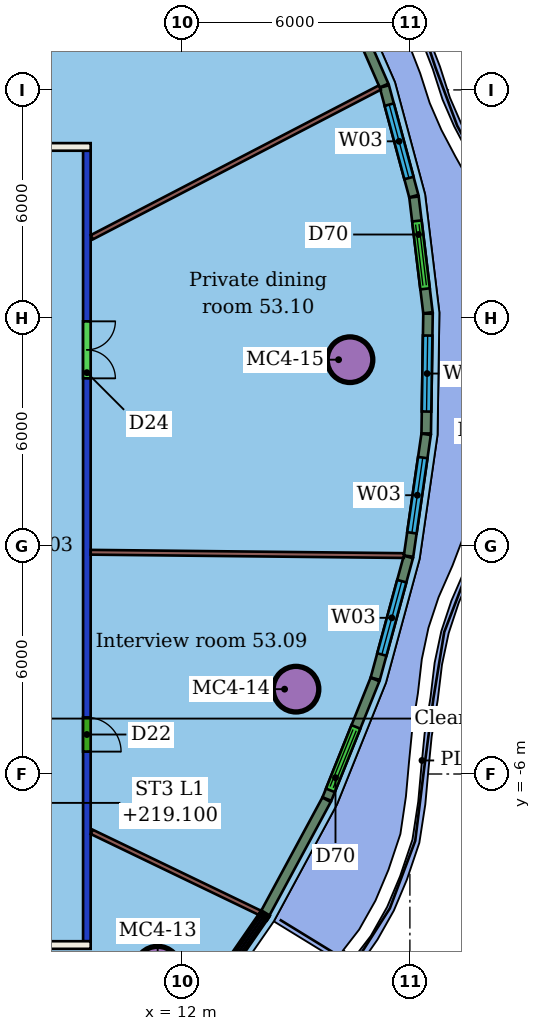
"""IFC4 building model, lengths in metres.
Left out: names, types, materials, properties, quantities, classifications, styles, units other than length and angle.
Written with IfcOpenShell. Run it as: python <this file> out.ifc"""

import sys

from ifc_helpers import new_model, si_unit, direction, frame, frame_2d, origin, origin_2d, place, context, subcontext, project, spatial, rectangle, hollow_circle, extrude, element, fill, save


model = new_model("IFC4")
c1 = context("Model", 3, precision=1e-05, world=origin(), true_north=direction((0.0, 1.0)))
c2 = subcontext(c1, "Body", "Model", "MODEL_VIEW")
j1 = project(units=[si_unit("LENGTHUNIT", "METRE"), si_unit("PLANEANGLEUNIT", "RADIAN")], contexts=[c1])
p1 = place(None, origin())
s1 = spatial("IfcSite", under=j1, at=p1, CompositionType="ELEMENT")
p2 = place(p1, origin())
s2 = spatial("IfcBuilding", under=s1, at=p2, CompositionType="ELEMENT")
p3 = place(p2, frame((0.0, 0.0, 217.3)))
s3 = spatial("IfcBuildingStorey", under=s2, at=p3, CompositionType="ELEMENT", Elevation=217.3)
for number, where, z_axis, x_axis in (
    (1, (11.363, -11.134, 0.0), (0.0, 0.0, 1.0), (1.0, 0.0, 0.0)),
    (2, (15.003, -3.768, 0.0), (0.0, 0.0, 1.0), (1.0, 0.0, 0.0)),
    (3, (16.424, 4.901, 0.0), (0.0, 0.0, 1.0), (1.0, 0.0, 0.0)),
):
    element("IfcColumn", number, at=place(p3, frame(where, z_axis=z_axis, x_axis=x_axis)), inside=s3, PredefinedType="COLUMN", context=c2, shape_type="SweptSolid", body=[
        extrude(hollow_circle(Radius=0.6, WallThickness=0.045, at=origin_2d()), origin(), (0.0, 0.0, 1.0), 3.45),
    ])
p4 = place(p3, frame((9.6, -10.5, 0.0), z_axis=(0.0, 0.0, 1.0), x_axis=(-1.0, 0.0, 0.0)))
e4 = element("IfcWall", 4, at=p4, inside=s3, PredefinedType="PARTITIONING", context=c2, shape_type="SweptSolid", body=[
    extrude(rectangle(XDim=31.2, YDim=0.2, at=frame_2d((15.6, 0.0))), origin(), (0.0, 0.0, 1.0), 3.45),
])
p5 = place(p4, frame((18.695, 0.0, 0.0)))
e5 = element("IfcOpeningElement", 5, at=p5, cuts=e4, PredefinedType="OPENING", context=c2, shape_type="SweptSolid", body=[
    extrude(rectangle(XDim=1.8, YDim=2.1, at=frame_2d((0.9, 1.05))), frame((0.0, 0.11, 0.0), z_axis=(0.0, -1.0, 0.0), x_axis=(1.0, 0.0, 0.0)), (0.0, 0.0, 1.0), 0.22),
])
p6 = place(p4, frame((12.68, 0.0, 0.0)))
e6 = element("IfcOpeningElement", 6, at=p6, cuts=e4, PredefinedType="OPENING", context=c2, shape_type="SweptSolid", body=[
    extrude(rectangle(XDim=1.2, YDim=2.4, at=frame_2d((0.6, 1.2))), frame((0.0, 0.11, 0.0), z_axis=(0.0, -1.0, 0.0), x_axis=(1.0, 0.0, 0.0)), (0.0, 0.0, 1.0), 0.22),
])
p7 = place(p4, frame((7.484, 0.0, 0.0)))
e7 = element("IfcOpeningElement", 7, at=p7, cuts=e4, PredefinedType="OPENING", context=c2, shape_type="SweptSolid", body=[
    extrude(rectangle(XDim=1.0, YDim=2.4, at=frame_2d((0.5, 1.2))), frame((0.0, 0.11, 0.0), z_axis=(0.0, -1.0, 0.0), x_axis=(1.0, 0.0, 0.0)), (0.0, 0.0, 1.0), 0.22),
])
p8 = place(p3, frame((-21.6, 10.5, 0.0), z_axis=(0.0, 0.0, 1.0), x_axis=(1.0, 0.0, 0.0)))
e8 = element("IfcWall", 8, at=p8, inside=s3, PredefinedType="PARTITIONING", context=c2, shape_type="SweptSolid", body=[
    extrude(rectangle(XDim=31.2, YDim=0.2, at=frame_2d((15.6, 0.0))), origin(), (0.0, 0.0, 1.0), 3.45),
])
p9 = place(p8, frame((20.759, 0.0, 0.0)))
e9 = element("IfcOpeningElement", 9, at=p9, cuts=e8, PredefinedType="OPENING", context=c2, shape_type="SweptSolid", body=[
    extrude(rectangle(XDim=1.0, YDim=2.4, at=frame_2d((0.5, 1.2))), frame((0.0, 0.11, 0.0), z_axis=(0.0, -1.0, 0.0), x_axis=(1.0, 0.0, 0.0)), (0.0, 0.0, 1.0), 0.22),
])
p10 = place(p8, frame((13.195, 0.0, 0.0)))
e10 = element("IfcOpeningElement", 10, at=p10, cuts=e8, PredefinedType="OPENING", context=c2, shape_type="SweptSolid", body=[
    extrude(rectangle(XDim=0.9, YDim=2.1, at=frame_2d((0.45, 1.05))), frame((0.0, 0.11, 0.0), z_axis=(0.0, -1.0, 0.0), x_axis=(1.0, 0.0, 0.0)), (0.0, 0.0, 1.0), 0.22),
])
p11 = place(p8, frame((8.927, 0.0, 0.0)))
e11 = element("IfcOpeningElement", 11, at=p11, cuts=e8, PredefinedType="OPENING", context=c2, shape_type="SweptSolid", body=[
    extrude(rectangle(XDim=0.9, YDim=2.1, at=frame_2d((0.45, 1.05))), frame((0.0, 0.11, 0.0), z_axis=(0.0, -1.0, 0.0), x_axis=(1.0, 0.0, 0.0)), (0.0, 0.0, 1.0), 0.22),
])
p12 = place(p8, frame((25.843, 0.0, 0.0)))
e12 = element("IfcOpeningElement", 12, at=p12, cuts=e8, PredefinedType="OPENING", context=c2, shape_type="SweptSolid", body=[
    extrude(rectangle(XDim=1.2, YDim=2.4, at=frame_2d((0.6, 1.2))), frame((0.0, 0.11, 0.0), z_axis=(0.0, -1.0, 0.0), x_axis=(1.0, 0.0, 0.0)), (0.0, 0.0, 1.0), 0.22),
])
p13 = place(p3, frame((9.5, 10.4, 0.0), z_axis=(0.0, 0.0, 1.0), x_axis=(0.0, -1.0, 0.0)))
e13 = element("IfcWall", 13, at=p13, inside=s3, PredefinedType="PARTITIONING", context=c2, shape_type="SweptSolid", body=[
    extrude(rectangle(XDim=20.8, YDim=0.2, at=frame_2d((10.4, 0.0))), origin(), (0.0, 0.0, 1.0), 3.05),
])
p14 = place(p13, frame((14.911, 0.0, 0.0)))
e14 = element("IfcOpeningElement", 14, at=p14, cuts=e13, PredefinedType="OPENING", context=c2, shape_type="SweptSolid", body=[
    extrude(rectangle(XDim=0.9, YDim=2.1, at=frame_2d((0.45, 1.05))), frame((0.0, 0.11, 0.0), z_axis=(0.0, -1.0, 0.0), x_axis=(1.0, 0.0, 0.0)), (0.0, 0.0, 1.0), 0.22),
])
p15 = place(p13, frame((4.489, 0.0, 0.0)))
e15 = element("IfcOpeningElement", 15, at=p15, cuts=e13, PredefinedType="OPENING", context=c2, shape_type="SweptSolid", body=[
    extrude(rectangle(XDim=1.5, YDim=2.1, at=frame_2d((0.75, 1.05))), frame((0.0, 0.11, 0.0), z_axis=(0.0, -1.0, 0.0), x_axis=(1.0, 0.0, 0.0)), (0.0, 0.0, 1.0), 0.22),
])
p16 = place(p3, frame((10.391, 21.124, 0.0), z_axis=(0.0, 0.0, 1.0), x_axis=(-0.613043629226, -0.790049054594, 0.0)))
e16 = element("IfcWall", 16, at=p16, inside=s3, PredefinedType="PARTITIONING", context=c2, shape_type="SweptSolid", body=[
    extrude(rectangle(XDim=13.271, YDim=0.125, at=frame_2d((6.636, 0.0))), origin(), (0.0, 0.0, 1.0), 3.45),
])
p17 = place(p3, frame((14.057, -9.655, 0.0), z_axis=(0.0, 0.0, 1.0), x_axis=(-0.901030422523, 0.433755896431, 0.0)))
e17 = element("IfcWall", 17, at=p17, inside=s3, PredefinedType="PARTITIONING", context=c2, shape_type="SweptSolid", body=[
    extrude(rectangle(XDim=4.917, YDim=0.125, at=frame_2d((2.458, 0.0))), origin(), (0.0, 0.0, 1.0), 3.45),
])
p18 = place(p3, frame((17.84, -0.253, 0.0), z_axis=(0.0, 0.0, 1.0), x_axis=(-0.999943746201, 0.0106068107, 0.0)))
e18 = element("IfcWall", 18, at=p18, inside=s3, PredefinedType="PARTITIONING", context=c2, shape_type="SweptSolid", body=[
    extrude(rectangle(XDim=8.24, YDim=0.125, at=frame_2d((4.12, 0.0))), origin(), (0.0, 0.0, 1.0), 3.45),
])
p19 = place(p3, frame((17.207, 12.061, 0.0), z_axis=(0.0, 0.0, 1.0), x_axis=(-0.887319286248, -0.461155596574, 0.0)))
e19 = element("IfcWall", 19, at=p19, inside=s3, PredefinedType="PARTITIONING", context=c2, shape_type="SweptSolid", body=[
    extrude(rectangle(XDim=8.54, YDim=0.125, at=frame_2d((4.27, 0.0))), origin(), (0.0, 0.0, 1.0), 3.45),
])
p20 = place(p3, frame((14.19, -9.671, 0.0), z_axis=(0.0, 0.0, 1.0), x_axis=(0.47528890286, 0.879829789685, 0.0)))
e20 = element("IfcWall", 20, at=p20, inside=s3, PredefinedType="SOLIDWALL", context=c2, shape_type="SweptSolid", body=[
    extrude(rectangle(XDim=3.403, YDim=0.25, at=frame_2d((1.701, 0.0))), origin(), (0.0, 0.0, 1.0), 3.1),
])
p21 = place(p3, frame((15.816, -6.658, 0.0), z_axis=(0.0, 0.0, 1.0), x_axis=(0.37322779977, 0.92773973154, 0.0)))
e21 = element("IfcWall", 21, at=p21, inside=s3, PredefinedType="SOLIDWALL", context=c2, shape_type="SweptSolid", body=[
    extrude(rectangle(XDim=3.39, YDim=0.25, at=frame_2d((1.695, 0.0))), origin(), (0.0, 0.0, 1.0), 3.1),
])
p22 = place(p21, frame((0.245, 0.0, 0.0)))
e22 = element("IfcOpeningElement", 22, at=p22, cuts=e21, PredefinedType="OPENING", context=c2, shape_type="SweptSolid", body=[
    extrude(rectangle(XDim=1.8, YDim=2.4, at=frame_2d((0.9, 1.2))), frame((0.0, 0.135, 0.0), z_axis=(0.0, -1.0, 0.0), x_axis=(1.0, 0.0, 0.0)), (0.0, 0.0, 1.0), 0.27),
])
p23 = place(p3, frame((17.089, -3.491, 0.0), z_axis=(0.0, 0.0, 1.0), x_axis=(0.262494842553, 0.964933395439, 0.0)))
e23 = element("IfcWall", 23, at=p23, inside=s3, PredefinedType="SOLIDWALL", context=c2, shape_type="SweptSolid", body=[
    extrude(rectangle(XDim=3.319, YDim=0.25, at=frame_2d((1.659, 0.0))), origin(), (0.0, 0.0, 1.0), 3.1),
])
p24 = place(p23, frame((0.659, 0.0, 0.9)))
e24 = element("IfcOpeningElement", 24, at=p24, cuts=e23, PredefinedType="OPENING", context=c2, shape_type="SweptSolid", body=[
    extrude(rectangle(XDim=2.0, YDim=2.1, at=frame_2d((1.0, 1.05))), frame((0.0, 0.135, 0.0), z_axis=(0.0, -1.0, 0.0), x_axis=(1.0, 0.0, 0.0)), (0.0, 0.0, 1.0), 0.27),
])
p25 = place(p3, frame((17.964, -0.267, 0.0), z_axis=(0.0, 0.0, 1.0), x_axis=(0.14297307374, 0.989726578498, 0.0)))
e25 = element("IfcWall", 25, at=p25, inside=s3, PredefinedType="SOLIDWALL", context=c2, shape_type="SweptSolid", body=[
    extrude(rectangle(XDim=3.238, YDim=0.25, at=frame_2d((1.619, 0.0))), origin(), (0.0, 0.0, 1.0), 3.1),
])
p26 = place(p25, frame((0.619, 0.0, 0.9)))
e26 = element("IfcOpeningElement", 26, at=p26, cuts=e25, PredefinedType="OPENING", context=c2, shape_type="SweptSolid", body=[
    extrude(rectangle(XDim=2.0, YDim=2.1, at=frame_2d((1.0, 1.05))), frame((0.0, 0.135, 0.0), z_axis=(0.0, -1.0, 0.0), x_axis=(1.0, 0.0, 0.0)), (0.0, 0.0, 1.0), 0.27),
])
p27 = place(p3, frame((18.429, 2.962, 0.0), z_axis=(0.0, 0.0, 1.0), x_axis=(0.01503123462, 0.999887024611, 0.0)))
e27 = element("IfcWall", 27, at=p27, inside=s3, PredefinedType="SOLIDWALL", context=c2, shape_type="SweptSolid", body=[
    extrude(rectangle(XDim=3.151, YDim=0.25, at=frame_2d((1.575, 0.0))), origin(), (0.0, 0.0, 1.0), 3.1),
])
p28 = place(p27, frame((0.575, 0.0, 0.9)))
e28 = element("IfcOpeningElement", 28, at=p28, cuts=e27, PredefinedType="OPENING", context=c2, shape_type="SweptSolid", body=[
    extrude(rectangle(XDim=2.0, YDim=2.1, at=frame_2d((1.0, 1.05))), frame((0.0, 0.135, 0.0), z_axis=(0.0, -1.0, 0.0), x_axis=(1.0, 0.0, 0.0)), (0.0, 0.0, 1.0), 0.27),
])
p29 = place(p3, frame((18.475, 6.137, 0.0), z_axis=(0.0, 0.0, 1.0), x_axis=(-0.119946033094, 0.992780413357, 0.0)))
e29 = element("IfcWall", 29, at=p29, inside=s3, PredefinedType="SOLIDWALL", context=c2, shape_type="SweptSolid", body=[
    extrude(rectangle(XDim=3.065, YDim=0.25, at=frame_2d((1.533, 0.0))), origin(), (0.0, 0.0, 1.0), 3.1),
])
p30 = place(p29, frame((0.633, 0.0, 0.0)))
e30 = element("IfcOpeningElement", 30, at=p30, cuts=e29, PredefinedType="OPENING", context=c2, shape_type="SweptSolid", body=[
    extrude(rectangle(XDim=1.8, YDim=2.4, at=frame_2d((0.9, 1.2))), frame((0.0, 0.135, 0.0), z_axis=(0.0, -1.0, 0.0), x_axis=(1.0, 0.0, 0.0)), (0.0, 0.0, 1.0), 0.27),
])
p31 = place(p3, frame((18.103, 9.206, 0.0), z_axis=(0.0, 0.0, 1.0), x_axis=(-0.25942805707, 0.965762436215, 0.0)))
e31 = element("IfcWall", 31, at=p31, inside=s3, PredefinedType="SOLIDWALL", context=c2, shape_type="SweptSolid", body=[
    extrude(rectangle(XDim=2.986, YDim=0.25, at=frame_2d((1.493, 0.0))), origin(), (0.0, 0.0, 1.0), 3.1),
])
p32 = place(p31, frame((0.493, 0.0, 0.9)))
e32 = element("IfcOpeningElement", 32, at=p32, cuts=e31, PredefinedType="OPENING", context=c2, shape_type="SweptSolid", body=[
    extrude(rectangle(XDim=2.0, YDim=2.1, at=frame_2d((1.0, 1.05))), frame((0.0, 0.135, 0.0), z_axis=(0.0, -1.0, 0.0), x_axis=(1.0, 0.0, 0.0)), (0.0, 0.0, 1.0), 0.27),
])
p33 = place(p3, frame((17.319, 12.115, 0.0), z_axis=(0.0, 0.0, 1.0), x_axis=(-0.40003123877, 0.91650150464, 0.0)))
e33 = element("IfcWall", 33, at=p33, inside=s3, PredefinedType="SOLIDWALL", context=c2, shape_type="SweptSolid", body=[
    extrude(rectangle(XDim=2.879, YDim=0.25, at=frame_2d((1.439, 0.0))), origin(), (0.0, 0.0, 1.0), 3.1),
])
p34 = place(p14, origin())
e34 = element("IfcDoor", 34, at=p34, inside=s3, OperationType="SINGLE_SWING_RIGHT", PredefinedType="DOOR", context=c2, shape_type="SweptSolid", body=[
    extrude(rectangle(XDim=0.9, YDim=2.1, at=frame_2d((0.45, 1.05))), frame((0.0, 0.025, 0.0), z_axis=(0.0, -1.0, 0.0), x_axis=(1.0, 0.0, 0.0)), (0.0, 0.0, 1.0), 0.05),
])
fill(e14, e34)
p35 = place(p15, origin())
e35 = element("IfcDoor", 35, at=p35, inside=s3, OperationType="DOUBLE_DOOR_SINGLE_SWING", PredefinedType="DOOR", context=c2, shape_type="SweptSolid", body=[
    extrude(rectangle(XDim=1.5, YDim=2.1, at=frame_2d((0.75, 1.05))), frame((0.0, 0.025, 0.0), z_axis=(0.0, -1.0, 0.0), x_axis=(1.0, 0.0, 0.0)), (0.0, 0.0, 1.0), 0.05),
])
fill(e15, e35)
p36 = place(p22, origin())
e36 = element("IfcDoor", 36, at=p36, inside=s3, OperationType="DOUBLE_DOOR_SLIDING", PredefinedType="DOOR", context=c2, shape_type="SweptSolid", body=[
    extrude(rectangle(XDim=1.8, YDim=2.4, at=frame_2d((0.9, 1.2))), frame((0.0, 0.025, 0.0), z_axis=(0.0, -1.0, 0.0), x_axis=(1.0, 0.0, 0.0)), (0.0, 0.0, 1.0), 0.05),
])
fill(e22, e36)
p37 = place(p24, origin())
e37 = element("IfcWindow", 37, at=p37, inside=s3, PartitioningType="SINGLE_PANEL", PredefinedType="WINDOW", context=c2, shape_type="SweptSolid", body=[
    extrude(rectangle(XDim=2.0, YDim=2.1, at=frame_2d((1.0, 1.05))), frame((0.0, 0.03, 0.0), z_axis=(0.0, -1.0, 0.0), x_axis=(1.0, 0.0, 0.0)), (0.0, 0.0, 1.0), 0.06),
])
fill(e24, e37)
p38 = place(p26, origin())
e38 = element("IfcWindow", 38, at=p38, inside=s3, PartitioningType="SINGLE_PANEL", PredefinedType="WINDOW", context=c2, shape_type="SweptSolid", body=[
    extrude(rectangle(XDim=2.0, YDim=2.1, at=frame_2d((1.0, 1.05))), frame((0.0, 0.03, 0.0), z_axis=(0.0, -1.0, 0.0), x_axis=(1.0, 0.0, 0.0)), (0.0, 0.0, 1.0), 0.06),
])
fill(e26, e38)
p39 = place(p28, origin())
e39 = element("IfcWindow", 39, at=p39, inside=s3, PartitioningType="SINGLE_PANEL", PredefinedType="WINDOW", context=c2, shape_type="SweptSolid", body=[
    extrude(rectangle(XDim=2.0, YDim=2.1, at=frame_2d((1.0, 1.05))), frame((0.0, 0.03, 0.0), z_axis=(0.0, -1.0, 0.0), x_axis=(1.0, 0.0, 0.0)), (0.0, 0.0, 1.0), 0.06),
])
fill(e28, e39)
p40 = place(p30, origin())
e40 = element("IfcDoor", 40, at=p40, inside=s3, OperationType="DOUBLE_DOOR_SLIDING", PredefinedType="DOOR", context=c2, shape_type="SweptSolid", body=[
    extrude(rectangle(XDim=1.8, YDim=2.4, at=frame_2d((0.9, 1.2))), frame((0.0, 0.025, 0.0), z_axis=(0.0, -1.0, 0.0), x_axis=(1.0, 0.0, 0.0)), (0.0, 0.0, 1.0), 0.05),
])
fill(e30, e40)
p41 = place(p32, origin())
e41 = element("IfcWindow", 41, at=p41, inside=s3, PartitioningType="SINGLE_PANEL", PredefinedType="WINDOW", context=c2, shape_type="SweptSolid", body=[
    extrude(rectangle(XDim=2.0, YDim=2.1, at=frame_2d((1.0, 1.05))), frame((0.0, 0.03, 0.0), z_axis=(0.0, -1.0, 0.0), x_axis=(1.0, 0.0, 0.0)), (0.0, 0.0, 1.0), 0.06),
])
fill(e32, e41)
save(model, sys.argv[1])
